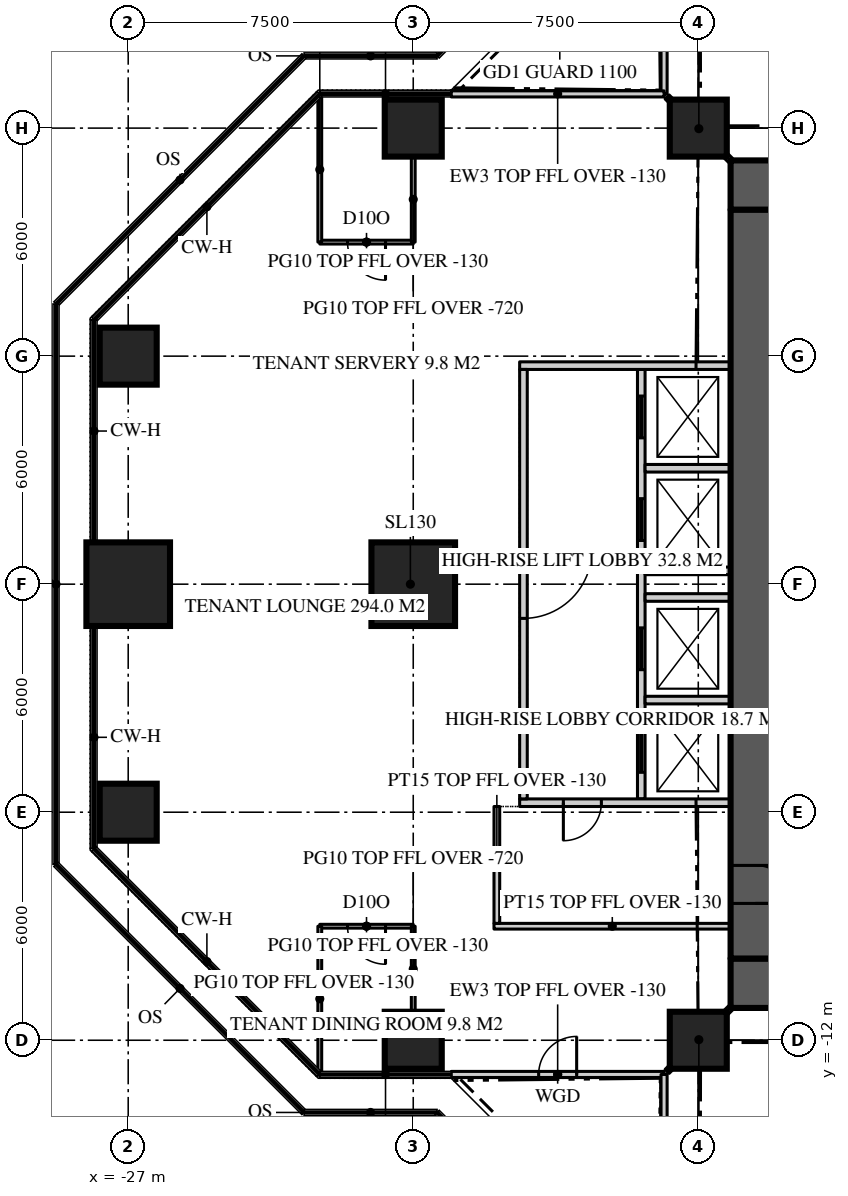
"""IFC4 building model, lengths in metres.
Left out: names, types, materials, properties, quantities, classifications, styles, units other than length and angle.
Written with IfcOpenShell. Run it as: python <this file> out.ifc"""

import sys

from ifc_helpers import new_model, si_unit, direction, frame, frame_2d, origin, origin_2d, place, context, subcontext, project, spatial, rectangle, extrude, element, fill, save


model = new_model("IFC4")
c1 = context("Model", 3, precision=1e-05, world=origin(), true_north=direction((0.0, 1.0)))
c2 = subcontext(c1, "Body", "Model", "MODEL_VIEW")
j1 = project(units=[si_unit("LENGTHUNIT", "METRE"), si_unit("PLANEANGLEUNIT", "RADIAN")], contexts=[c1])
p1 = place(None, origin())
s1 = spatial("IfcSite", under=j1, at=p1, CompositionType="ELEMENT")
p2 = place(p1, origin())
s2 = spatial("IfcBuilding", under=s1, at=p2, CompositionType="ELEMENT")
p3 = place(p2, frame((0.0, 0.0, 263.4)))
s3 = spatial("IfcBuildingStorey", under=s2, at=p3, CompositionType="ELEMENT", Elevation=263.4)
p4 = place(p3, frame((-11.15, 10.5, 0.0), z_axis=(0.0, 0.0, 1.0), x_axis=(1.0, 0.0, 0.0)))
e1 = element("IfcWall", 1, at=p4, inside=s3, PredefinedType="SHEAR", context=c2, shape_type="SweptSolid", body=[
    extrude(rectangle(XDim=22.3, YDim=1.3, at=frame_2d((11.15, 0.0))), origin(), (0.0, 0.0, 1.0), 3.9),
])
p5 = place(p4, frame((4.25, 0.0, 0.0)))
e2 = element("IfcOpeningElement", 2, at=p5, cuts=e1, PredefinedType="OPENING", context=c2, shape_type="SweptSolid", body=[
    extrude(rectangle(XDim=1.8, YDim=2.2, at=frame_2d((0.9, 1.1))), frame((0.0, 0.66, 0.0), z_axis=(0.0, -1.0, 0.0), x_axis=(1.0, 0.0, 0.0)), (0.0, 0.0, 1.0), 1.32),
])
p6 = place(p4, frame((16.25, 0.0, 0.0)))
e3 = element("IfcOpeningElement", 3, at=p6, cuts=e1, PredefinedType="OPENING", context=c2, shape_type="SweptSolid", body=[
    extrude(rectangle(XDim=1.8, YDim=2.2, at=frame_2d((0.9, 1.1))), frame((0.0, 0.66, 0.0), z_axis=(0.0, -1.0, 0.0), x_axis=(1.0, 0.0, 0.0)), (0.0, 0.0, 1.0), 1.32),
])
p7 = place(p3, frame((11.15, -10.5, 0.0), z_axis=(0.0, 0.0, 1.0), x_axis=(-1.0, 0.0, 0.0)))
e4 = element("IfcWall", 4, at=p7, inside=s3, PredefinedType="SHEAR", context=c2, shape_type="SweptSolid", body=[
    extrude(rectangle(XDim=22.3, YDim=1.3, at=frame_2d((11.15, 0.0))), origin(), (0.0, 0.0, 1.0), 3.9),
])
p8 = place(p7, frame((16.25, 0.0, 0.0)))
e5 = element("IfcOpeningElement", 5, at=p8, cuts=e4, PredefinedType="OPENING", context=c2, shape_type="SweptSolid", body=[
    extrude(rectangle(XDim=1.8, YDim=2.2, at=frame_2d((0.9, 1.1))), frame((0.0, 0.66, 0.0), z_axis=(0.0, -1.0, 0.0), x_axis=(1.0, 0.0, 0.0)), (0.0, 0.0, 1.0), 1.32),
])
p9 = place(p7, frame((4.25, 0.0, 0.0)))
e6 = element("IfcOpeningElement", 6, at=p9, cuts=e4, PredefinedType="OPENING", context=c2, shape_type="SweptSolid", body=[
    extrude(rectangle(XDim=1.8, YDim=2.2, at=frame_2d((0.9, 1.1))), frame((0.0, 0.66, 0.0), z_axis=(0.0, -1.0, 0.0), x_axis=(1.0, 0.0, 0.0)), (0.0, 0.0, 1.0), 1.32),
])
p10 = place(p3, frame((-10.5, 9.85, 0.0), z_axis=(0.0, 0.0, 1.0), x_axis=(0.0, -1.0, 0.0)))
e7 = element("IfcWall", 7, at=p10, inside=s3, PredefinedType="SHEAR", context=c2, shape_type="SweptSolid", body=[
    extrude(rectangle(XDim=19.7, YDim=1.3, at=frame_2d((9.85, 0.0))), origin(), (0.0, 0.0, 1.0), 3.9),
])
p11 = place(p10, frame((17.25, 0.0, 0.0)))
e8 = element("IfcOpeningElement", 8, at=p11, cuts=e7, PredefinedType="OPENING", context=c2, shape_type="SweptSolid", body=[
    extrude(rectangle(XDim=1.0, YDim=2.2, at=frame_2d((0.5, 1.1))), frame((0.0, 0.66, 0.0), z_axis=(0.0, -1.0, 0.0), x_axis=(1.0, 0.0, 0.0)), (0.0, 0.0, 1.0), 1.32),
])
for number, where, z_axis, x_axis in (
    (9, (-19.5, -12.0, 0.0), (0.0, 0.0, 1.0), (1.0, 0.0, 0.0)),
    (10, (-12.0, -12.0, 0.0), (0.0, 0.0, 1.0), (1.0, 0.0, 0.0)),
    (11, (-27.0, -6.0, 0.0), (0.0, 0.0, 1.0), (1.0, 0.0, 0.0)),
):
    element("IfcColumn", number, at=place(p3, frame(where, z_axis=z_axis, x_axis=x_axis)), inside=s3, PredefinedType="COLUMN", context=c2, shape_type="SweptSolid", body=[
        extrude(rectangle(XDim=1.5, YDim=1.5, at=origin_2d()), origin(), (0.0, 0.0, 1.0), 3.9),
    ])
for number, where, z_axis, x_axis in (
    (12, (-27.0, 0.0, 0.0), (0.0, 0.0, 1.0), (1.0, 0.0, 0.0)),
    (13, (-19.5, 0.0, 0.0), (0.0, 0.0, 1.0), (1.0, 0.0, 0.0)),
):
    element("IfcColumn", number, at=place(p3, frame(where, z_axis=z_axis, x_axis=x_axis)), inside=s3, PredefinedType="COLUMN", context=c2, shape_type="SweptSolid", body=[
        extrude(rectangle(XDim=2.2, YDim=2.2, at=origin_2d()), origin(), (0.0, 0.0, 1.0), 3.9),
    ])
for number, where, z_axis, x_axis in (
    (14, (-27.0, 6.0, 0.0), (0.0, 0.0, 1.0), (1.0, 0.0, 0.0)),
    (15, (-19.5, 12.0, 0.0), (0.0, 0.0, 1.0), (1.0, 0.0, 0.0)),
    (16, (-12.0, 12.0, 0.0), (0.0, 0.0, 1.0), (1.0, 0.0, 0.0)),
):
    element("IfcColumn", number, at=place(p3, frame(where, z_axis=z_axis, x_axis=x_axis)), inside=s3, PredefinedType="COLUMN", context=c2, shape_type="SweptSolid", body=[
        extrude(rectangle(XDim=1.5, YDim=1.5, at=origin_2d()), origin(), (0.0, 0.0, 1.0), 3.9),
    ])
p12 = place(p3, frame((-12.9, 18.5, 0.0), z_axis=(0.0, 0.0, 1.0), x_axis=(0.0, -1.0, 0.0)))
e17 = element("IfcWall", 17, at=p12, inside=s3, PredefinedType="SOLIDWALL", context=c2, shape_type="SweptSolid", body=[
    extrude(rectangle(XDim=5.6, YDim=0.16, at=frame_2d((2.8, 0.0))), origin(), (0.0, 0.0, 1.0), 3.65),
])
p13 = place(p12, frame((2.3, 0.0, 0.0)))
e18 = element("IfcOpeningElement", 18, at=p13, cuts=e17, PredefinedType="OPENING", context=c2, shape_type="SweptSolid", body=[
    extrude(rectangle(XDim=1.0, YDim=2.2, at=frame_2d((0.5, 1.1))), frame((0.0, 0.09, 0.0), z_axis=(0.0, -1.0, 0.0), x_axis=(1.0, 0.0, 0.0)), (0.0, 0.0, 1.0), 0.18),
])
p14 = place(p3, frame((-12.9, 12.9, 0.0), z_axis=(0.0, 0.0, 1.0), x_axis=(-1.0, 0.0, 0.0)))
e19 = element("IfcWall", 19, at=p14, inside=s3, PredefinedType="SOLIDWALL", context=c2, shape_type="SweptSolid", body=[
    extrude(rectangle(XDim=5.6, YDim=0.16, at=frame_2d((2.8, 0.0))), origin(), (0.0, 0.0, 1.0), 3.77),
])
p15 = place(p3, frame((-18.5, -12.9, 0.0), z_axis=(0.0, 0.0, 1.0), x_axis=(1.0, 0.0, 0.0)))
e20 = element("IfcWall", 20, at=p15, inside=s3, PredefinedType="SOLIDWALL", context=c2, shape_type="SweptSolid", body=[
    extrude(rectangle(XDim=5.6, YDim=0.16, at=frame_2d((2.8, 0.0))), origin(), (0.0, 0.0, 1.0), 3.77),
])
p16 = place(p15, frame((2.3, 0.0, 0.0)))
e21 = element("IfcOpeningElement", 21, at=p16, cuts=e20, PredefinedType="OPENING", context=c2, shape_type="SweptSolid", body=[
    extrude(rectangle(XDim=1.0, YDim=2.2, at=frame_2d((0.5, 1.1))), frame((0.0, 0.09, 0.0), z_axis=(0.0, -1.0, 0.0), x_axis=(1.0, 0.0, 0.0)), (0.0, 0.0, 1.0), 0.18),
])
p17 = place(p3, frame((-12.9, -12.9, 0.0), z_axis=(0.0, 0.0, 1.0), x_axis=(0.0, -1.0, 0.0)))
e22 = element("IfcWall", 22, at=p17, inside=s3, PredefinedType="SOLIDWALL", context=c2, shape_type="SweptSolid", body=[
    extrude(rectangle(XDim=5.6, YDim=0.16, at=frame_2d((2.8, 0.0))), origin(), (0.0, 0.0, 1.0), 3.77),
])
p18 = place(p3, frame((-19.5, -9.0, 0.0), z_axis=(0.0, 0.0, 1.0), x_axis=(-1.0, 0.0, 0.0)))
e23 = element("IfcWall", 23, at=p18, inside=s3, PredefinedType="PARTITIONING", context=c2, shape_type="SweptSolid", body=[
    extrude(rectangle(XDim=2.459, YDim=0.1, at=frame_2d((1.229, 0.0))), origin(), (0.0, 0.0, 1.0), 3.77),
])
p19 = place(p18, frame((0.729, 0.0, 0.0)))
e24 = element("IfcOpeningElement", 24, at=p19, cuts=e23, PredefinedType="OPENING", context=c2, shape_type="SweptSolid", body=[
    extrude(rectangle(XDim=1.0, YDim=2.2, at=frame_2d((0.5, 1.1))), frame((0.0, 0.06, 0.0), z_axis=(0.0, -1.0, 0.0), x_axis=(1.0, 0.0, 0.0)), (0.0, 0.0, 1.0), 0.12),
])
p20 = place(p3, frame((-19.5, -9.0, 0.0), z_axis=(0.0, 0.0, 1.0), x_axis=(0.0, -1.0, 0.0)))
e25 = element("IfcWall", 25, at=p20, inside=s3, PredefinedType="PARTITIONING", context=c2, shape_type="SweptSolid", body=[
    extrude(rectangle(XDim=2.25, YDim=0.1, at=frame_2d((1.125, 0.0))), origin(), (0.0, 0.0, 1.0), 3.18),
])
p21 = place(p3, frame((-21.959, -9.0, 0.0), z_axis=(0.0, 0.0, 1.0), x_axis=(0.0, -1.0, 0.0)))
e26 = element("IfcWall", 26, at=p21, inside=s3, PredefinedType="PARTITIONING", context=c2, shape_type="SweptSolid", body=[
    extrude(rectangle(XDim=3.82, YDim=0.1, at=frame_2d((1.91, 0.0))), origin(), (0.0, 0.0, 1.0), 3.77),
])
p22 = place(p3, frame((-19.5, 9.0, 0.0), z_axis=(0.0, 0.0, 1.0), x_axis=(-1.0, 0.0, 0.0)))
e27 = element("IfcWall", 27, at=p22, inside=s3, PredefinedType="PARTITIONING", context=c2, shape_type="SweptSolid", body=[
    extrude(rectangle(XDim=2.459, YDim=0.1, at=frame_2d((1.229, 0.0))), origin(), (0.0, 0.0, 1.0), 3.77),
])
p23 = place(p22, frame((0.729, 0.0, 0.0)))
e28 = element("IfcOpeningElement", 28, at=p23, cuts=e27, PredefinedType="OPENING", context=c2, shape_type="SweptSolid", body=[
    extrude(rectangle(XDim=1.0, YDim=2.2, at=frame_2d((0.5, 1.1))), frame((0.0, 0.06, 0.0), z_axis=(0.0, -1.0, 0.0), x_axis=(1.0, 0.0, 0.0)), (0.0, 0.0, 1.0), 0.12),
])
p24 = place(p3, frame((-19.5, 9.0, 0.0), z_axis=(0.0, 0.0, 1.0), x_axis=(0.0, 1.0, 0.0)))
e29 = element("IfcWall", 29, at=p24, inside=s3, PredefinedType="PARTITIONING", context=c2, shape_type="SweptSolid", body=[
    extrude(rectangle(XDim=2.25, YDim=0.1, at=frame_2d((1.125, 0.0))), origin(), (0.0, 0.0, 1.0), 3.18),
])
p25 = place(p3, frame((-21.959, 9.0, 0.0), z_axis=(0.0, 0.0, 1.0), x_axis=(0.0, 1.0, 0.0)))
e30 = element("IfcWall", 30, at=p25, inside=s3, PredefinedType="PARTITIONING", context=c2, shape_type="SweptSolid", body=[
    extrude(rectangle(XDim=3.82, YDim=0.1, at=frame_2d((1.91, 0.0))), origin(), (0.0, 0.0, 1.0), 3.77),
])
p26 = place(p3, frame((-13.5, 5.65, 0.0), z_axis=(0.0, 0.0, 1.0), x_axis=(0.0, -1.0, 0.0)))
e31 = element("IfcWall", 31, at=p26, inside=s3, PredefinedType="SOLIDWALL", context=c2, shape_type="SweptSolid", body=[
    extrude(rectangle(XDim=11.3, YDim=0.2, at=frame_2d((5.65, 0.0))), origin(), (0.0, 0.0, 1.0), 3.7),
])
p27 = place(p26, frame((0.7, 0.0, 0.0)))
e32 = element("IfcOpeningElement", 32, at=p27, cuts=e31, PredefinedType="OPENING", context=c2, shape_type="SweptSolid", body=[
    extrude(rectangle(XDim=1.1, YDim=2.2, at=frame_2d((0.55, 1.1))), frame((0.0, 0.11, 0.0), z_axis=(0.0, -1.0, 0.0), x_axis=(1.0, 0.0, 0.0)), (0.0, 0.0, 1.0), 0.22),
])
p28 = place(p26, frame((3.4, 0.0, 0.0)))
e33 = element("IfcOpeningElement", 33, at=p28, cuts=e31, PredefinedType="OPENING", context=c2, shape_type="SweptSolid", body=[
    extrude(rectangle(XDim=1.1, YDim=2.2, at=frame_2d((0.55, 1.1))), frame((0.0, 0.11, 0.0), z_axis=(0.0, -1.0, 0.0), x_axis=(1.0, 0.0, 0.0)), (0.0, 0.0, 1.0), 0.22),
])
p29 = place(p26, frame((6.8, 0.0, 0.0)))
e34 = element("IfcOpeningElement", 34, at=p29, cuts=e31, PredefinedType="OPENING", context=c2, shape_type="SweptSolid", body=[
    extrude(rectangle(XDim=1.1, YDim=2.2, at=frame_2d((0.55, 1.1))), frame((0.0, 0.11, 0.0), z_axis=(0.0, -1.0, 0.0), x_axis=(1.0, 0.0, 0.0)), (0.0, 0.0, 1.0), 0.22),
])
p30 = place(p26, frame((9.5, 0.0, 0.0)))
e35 = element("IfcOpeningElement", 35, at=p30, cuts=e31, PredefinedType="OPENING", context=c2, shape_type="SweptSolid", body=[
    extrude(rectangle(XDim=1.1, YDim=2.2, at=frame_2d((0.55, 1.1))), frame((0.0, 0.11, 0.0), z_axis=(0.0, -1.0, 0.0), x_axis=(1.0, 0.0, 0.0)), (0.0, 0.0, 1.0), 0.22),
])
p31 = place(p3, frame((-11.15, 5.75, 0.0), z_axis=(0.0, 0.0, 1.0), x_axis=(-1.0, 0.0, 0.0)))
e36 = element("IfcWall", 36, at=p31, inside=s3, PredefinedType="SOLIDWALL", context=c2, shape_type="SweptSolid", body=[
    extrude(rectangle(XDim=5.55, YDim=0.2, at=frame_2d((2.775, 0.0))), origin(), (0.0, 0.0, 1.0), 3.7),
])
p32 = place(p3, frame((-11.15, -5.75, 0.0), z_axis=(0.0, 0.0, 1.0), x_axis=(-1.0, 0.0, 0.0)))
e37 = element("IfcWall", 37, at=p32, inside=s3, PredefinedType="SOLIDWALL", context=c2, shape_type="SweptSolid", body=[
    extrude(rectangle(XDim=5.55, YDim=0.2, at=frame_2d((2.775, 0.0))), origin(), (0.0, 0.0, 1.0), 3.7),
])
p33 = place(p32, frame((3.4, 0.0, 0.0)))
e38 = element("IfcOpeningElement", 38, at=p33, cuts=e37, PredefinedType="OPENING", context=c2, shape_type="SweptSolid", body=[
    extrude(rectangle(XDim=1.0, YDim=2.2, at=frame_2d((0.5, 1.1))), frame((0.0, 0.11, 0.0), z_axis=(0.0, -1.0, 0.0), x_axis=(1.0, 0.0, 0.0)), (0.0, 0.0, 1.0), 0.22),
])
for number, where, z_axis, x_axis in (
    (39, (-11.15, 3.05, 0.0), (0.0, 0.0, 1.0), (-1.0, 0.0, 0.0)),
    (40, (-11.15, 0.35, 0.0), (0.0, 0.0, 1.0), (-1.0, 0.0, 0.0)),
    (41, (-11.15, -0.35, 0.0), (0.0, 0.0, 1.0), (-1.0, 0.0, 0.0)),
    (42, (-11.15, -3.05, 0.0), (0.0, 0.0, 1.0), (-1.0, 0.0, 0.0)),
):
    element("IfcWall", number, at=place(p3, frame(where, z_axis=z_axis, x_axis=x_axis)), inside=s3, PredefinedType="SOLIDWALL", context=c2, shape_type="SweptSolid", body=[
        extrude(rectangle(XDim=2.25, YDim=0.2, at=frame_2d((1.125, 0.0))), origin(), (0.0, 0.0, 1.0), 3.7),
    ])
p34 = place(p3, frame((-16.6, 5.65, 0.0), z_axis=(0.0, 0.0, 1.0), x_axis=(0.0, -1.0, 0.0)))
e43 = element("IfcWall", 43, at=p34, inside=s3, PredefinedType="SOLIDWALL", context=c2, shape_type="SweptSolid", body=[
    extrude(rectangle(XDim=11.3, YDim=0.2, at=frame_2d((5.65, 0.0))), origin(), (0.0, 0.0, 1.0), 3.18),
])
p35 = place(p34, frame((4.75, 0.0, 0.0)))
e44 = element("IfcOpeningElement", 44, at=p35, cuts=e43, PredefinedType="OPENING", context=c2, shape_type="SweptSolid", body=[
    extrude(rectangle(XDim=1.8, YDim=2.2, at=frame_2d((0.9, 1.1))), frame((0.0, 0.11, 0.0), z_axis=(0.0, -1.0, 0.0), x_axis=(1.0, 0.0, 0.0)), (0.0, 0.0, 1.0), 0.22),
])
p36 = place(p3, frame((-11.15, 11.15, 0.0), z_axis=(0.0, 0.0, 1.0), x_axis=(-0.707106781187, 0.707106781187, 0.0)))
e45 = element("IfcWall", 45, at=p36, inside=s3, PredefinedType="PARTITIONING", context=c2, shape_type="SweptSolid", body=[
    extrude(rectangle(XDim=2.362, YDim=0.15, at=frame_2d((1.181, 0.0))), origin(), (0.0, 0.0, 1.0), 3.77),
])
p37 = place(p3, frame((-11.15, -11.15, 0.0), z_axis=(0.0, 0.0, 1.0), x_axis=(-0.707106781187, -0.707106781187, 0.0)))
e46 = element("IfcWall", 46, at=p37, inside=s3, PredefinedType="PARTITIONING", context=c2, shape_type="SweptSolid", body=[
    extrude(rectangle(XDim=2.362, YDim=0.15, at=frame_2d((1.181, 0.0))), origin(), (0.0, 0.0, 1.0), 3.22),
])
p38 = place(p3, frame((-11.15, -9.0, 0.0), z_axis=(0.0, 0.0, 1.0), x_axis=(-1.0, 0.0, 0.0)))
e47 = element("IfcWall", 47, at=p38, inside=s3, PredefinedType="PARTITIONING", context=c2, shape_type="SweptSolid", body=[
    extrude(rectangle(XDim=6.225, YDim=0.15, at=frame_2d((3.113, 0.0))), origin(), (0.0, 0.0, 1.0), 3.77),
])
p39 = place(p3, frame((-17.3, -5.85, 0.0), z_axis=(0.0, 0.0, 1.0), x_axis=(0.0, -1.0, 0.0)))
e48 = element("IfcWall", 48, at=p39, inside=s3, PredefinedType="PARTITIONING", context=c2, shape_type="SweptSolid", body=[
    extrude(rectangle(XDim=3.075, YDim=0.15, at=frame_2d((1.538, 0.0))), origin(), (0.0, 0.0, 1.0), 3.77),
])
p40 = place(p16, origin())
e49 = element("IfcDoor", 49, at=p40, inside=s3, OperationType="SINGLE_SWING_RIGHT", PredefinedType="DOOR", context=c2, shape_type="SweptSolid", body=[
    extrude(rectangle(XDim=1.0, YDim=2.2, at=frame_2d((0.5, 1.1))), frame((0.0, 0.025, 0.0), z_axis=(0.0, -1.0, 0.0), x_axis=(1.0, 0.0, 0.0)), (0.0, 0.0, 1.0), 0.05),
])
fill(e21, e49)
p41 = place(p11, origin())
e50 = element("IfcDoor", 50, at=p41, inside=s3, OperationType="SINGLE_SWING_RIGHT", PredefinedType="DOOR", context=c2, shape_type="SweptSolid", body=[
    extrude(rectangle(XDim=1.0, YDim=2.2, at=frame_2d((0.5, 1.1))), frame((0.0, 0.025, 0.0), z_axis=(0.0, -1.0, 0.0), x_axis=(1.0, 0.0, 0.0)), (0.0, 0.0, 1.0), 0.05),
])
fill(e8, e50)
p42 = place(p19, origin())
e51 = element("IfcDoor", 51, at=p42, inside=s3, OperationType="SINGLE_SWING_LEFT", PredefinedType="DOOR", context=c2, shape_type="SweptSolid", body=[
    extrude(rectangle(XDim=1.0, YDim=2.2, at=frame_2d((0.5, 1.1))), frame((0.0, 0.025, 0.0), z_axis=(0.0, -1.0, 0.0), x_axis=(1.0, 0.0, 0.0)), (0.0, 0.0, 1.0), 0.05),
])
fill(e24, e51)
p43 = place(p23, origin())
e52 = element("IfcDoor", 52, at=p43, inside=s3, OperationType="SINGLE_SWING_LEFT", PredefinedType="DOOR", context=c2, shape_type="SweptSolid", body=[
    extrude(rectangle(XDim=1.0, YDim=2.2, at=frame_2d((0.5, 1.1))), frame((0.0, 0.025, 0.0), z_axis=(0.0, -1.0, 0.0), x_axis=(1.0, 0.0, 0.0)), (0.0, 0.0, 1.0), 0.05),
])
fill(e28, e52)
p44 = place(p35, origin())
e53 = element("IfcDoor", 53, at=p44, inside=s3, OperationType="DOUBLE_DOOR_DOUBLE_SWING", PredefinedType="DOOR", context=c2, shape_type="SweptSolid", body=[
    extrude(rectangle(XDim=1.8, YDim=2.2, at=frame_2d((0.9, 1.1))), frame((0.0, 0.025, 0.0), z_axis=(0.0, -1.0, 0.0), x_axis=(1.0, 0.0, 0.0)), (0.0, 0.0, 1.0), 0.05),
])
fill(e44, e53)
p45 = place(p27, origin())
e54 = element("IfcDoor", 54, at=p45, inside=s3, OperationType="SLIDING_TO_LEFT", PredefinedType="DOOR", context=c2, shape_type="SweptSolid", body=[
    extrude(rectangle(XDim=1.1, YDim=2.2, at=frame_2d((0.55, 1.1))), frame((0.0, 0.025, 0.0), z_axis=(0.0, -1.0, 0.0), x_axis=(1.0, 0.0, 0.0)), (0.0, 0.0, 1.0), 0.05),
])
fill(e32, e54)
p46 = place(p28, origin())
e55 = element("IfcDoor", 55, at=p46, inside=s3, OperationType="SLIDING_TO_LEFT", PredefinedType="DOOR", context=c2, shape_type="SweptSolid", body=[
    extrude(rectangle(XDim=1.1, YDim=2.2, at=frame_2d((0.55, 1.1))), frame((0.0, 0.025, 0.0), z_axis=(0.0, -1.0, 0.0), x_axis=(1.0, 0.0, 0.0)), (0.0, 0.0, 1.0), 0.05),
])
fill(e33, e55)
p47 = place(p29, origin())
e56 = element("IfcDoor", 56, at=p47, inside=s3, OperationType="SLIDING_TO_LEFT", PredefinedType="DOOR", context=c2, shape_type="SweptSolid", body=[
    extrude(rectangle(XDim=1.1, YDim=2.2, at=frame_2d((0.55, 1.1))), frame((0.0, 0.025, 0.0), z_axis=(0.0, -1.0, 0.0), x_axis=(1.0, 0.0, 0.0)), (0.0, 0.0, 1.0), 0.05),
])
fill(e34, e56)
p48 = place(p30, origin())
e57 = element("IfcDoor", 57, at=p48, inside=s3, OperationType="SLIDING_TO_LEFT", PredefinedType="DOOR", context=c2, shape_type="SweptSolid", body=[
    extrude(rectangle(XDim=1.1, YDim=2.2, at=frame_2d((0.55, 1.1))), frame((0.0, 0.025, 0.0), z_axis=(0.0, -1.0, 0.0), x_axis=(1.0, 0.0, 0.0)), (0.0, 0.0, 1.0), 0.05),
])
fill(e35, e57)
p49 = place(p33, origin())
e58 = element("IfcDoor", 58, at=p49, inside=s3, OperationType="SINGLE_SWING_RIGHT", PredefinedType="DOOR", context=c2, shape_type="SweptSolid", body=[
    extrude(rectangle(XDim=1.0, YDim=2.2, at=frame_2d((0.5, 1.1))), frame((0.0, 0.025, 0.0), z_axis=(0.0, -1.0, 0.0), x_axis=(1.0, 0.0, 0.0)), (0.0, 0.0, 1.0), 0.05),
])
fill(e38, e58)
save(model, sys.argv[1])
